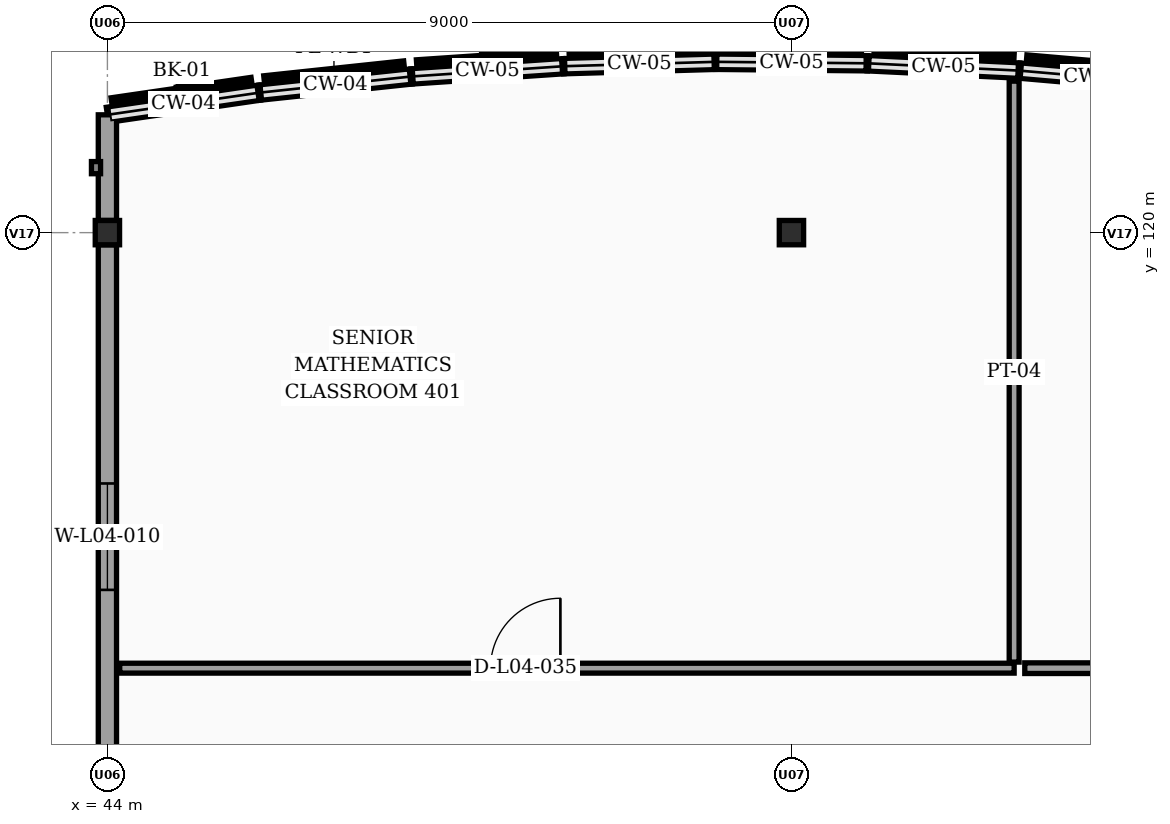
"""IFC4 building model, lengths in metres.
Left out: names, types, materials, properties, quantities, classifications, styles, units other than length and angle.
Written with IfcOpenShell. Run it as: python <this file> out.ifc"""

import sys

from ifc_helpers import new_model, si_unit, direction, frame, frame_2d, origin, origin_2d, place, context, subcontext, project, spatial, rectangle, extrude, element, fill, save


model = new_model("IFC4")
c1 = context("Model", 3, precision=1e-05, world=origin(), true_north=direction((0.0, 1.0)))
c2 = subcontext(c1, "Body", "Model", "MODEL_VIEW")
j1 = project(units=[si_unit("LENGTHUNIT", "METRE"), si_unit("PLANEANGLEUNIT", "RADIAN")], contexts=[c1])
p1 = place(None, origin())
s1 = spatial("IfcSite", under=j1, at=p1, CompositionType="ELEMENT")
p2 = place(p1, origin())
s2 = spatial("IfcBuilding", under=s1, at=p2, CompositionType="ELEMENT")
p3 = place(p2, frame((0.0, 0.0, 16.2)))
s3 = spatial("IfcBuildingStorey", under=s2, at=p3, CompositionType="ELEMENT", Elevation=16.2)
for number, where, z_axis, x_axis in (
    (1, (44.0, 120.0, 0.0), (0.0, 0.0, 1.0), (1.0, 0.0, 0.0)),
    (2, (53.0, 120.0, 0.0), (0.0, 0.0, 1.0), (1.0, 0.0, 0.0)),
):
    element("IfcColumn", number, at=place(p3, frame(where, z_axis=z_axis, x_axis=x_axis)), inside=s3, PredefinedType="COLUMN", context=c2, shape_type="SweptSolid", body=[
        extrude(rectangle(XDim=0.32, YDim=0.32, at=origin_2d()), origin(), (0.0, 0.0, 1.0), 3.9),
    ])
p4 = place(p3, frame((44.0, 121.55, 0.0), z_axis=(0.0, 0.0, 1.0), x_axis=(0.989544477223, 0.144228040259, 0.0)))
e3 = element("IfcWall", 3, at=p4, inside=s3, PredefinedType="SOLIDWALL", context=c2, shape_type="SweptSolid", body=[
    extrude(rectangle(XDim=2.021, YDim=0.2, at=frame_2d((1.011, 0.0))), origin(), (0.0, 0.0, 1.0), 0.95),
])
p5 = place(p3, frame((46.0, 121.842, 0.0), z_axis=(0.0, 0.0, 1.0), x_axis=(0.994395160059, 0.105727317433, 0.0)))
e4 = element("IfcWall", 4, at=p5, inside=s3, PredefinedType="SOLIDWALL", context=c2, shape_type="SweptSolid", body=[
    extrude(rectangle(XDim=2.011, YDim=0.2, at=frame_2d((1.006, 0.0))), origin(), (0.0, 0.0, 1.0), 0.95),
])
p6 = place(p3, frame((48.0, 122.054, 0.0), z_axis=(0.0, 0.0, 1.0), x_axis=(0.997729302978, 0.067351599676, 0.0)))
e5 = element("IfcWall", 5, at=p6, inside=s3, PredefinedType="SOLIDWALL", context=c2, shape_type="SweptSolid", body=[
    extrude(rectangle(XDim=2.005, YDim=0.2, at=frame_2d((1.002, 0.0))), origin(), (0.0, 0.0, 1.0), 0.95),
])
p7 = place(p3, frame((50.0, 122.189, 0.0), z_axis=(0.0, 0.0, 1.0), x_axis=(0.999581770858, 0.028918564416, 0.0)))
e6 = element("IfcWall", 6, at=p7, inside=s3, PredefinedType="SOLIDWALL", context=c2, shape_type="SweptSolid", body=[
    extrude(rectangle(XDim=2.001, YDim=0.2, at=frame_2d((1.0, 0.0))), origin(), (0.0, 0.0, 1.0), 0.95),
])
p8 = place(p3, frame((52.0, 122.247, 0.0), z_axis=(0.0, 0.0, 1.0), x_axis=(0.999953504169, -0.009643106302, 0.0)))
e7 = element("IfcWall", 7, at=p8, inside=s3, PredefinedType="SOLIDWALL", context=c2, shape_type="SweptSolid", body=[
    extrude(rectangle(XDim=2.0, YDim=0.2, at=frame_2d((1.0, 0.0))), origin(), (0.0, 0.0, 1.0), 0.95),
])
p9 = place(p3, frame((54.0, 122.228, 0.0), z_axis=(0.0, 0.0, 1.0), x_axis=(0.99884540439, -0.048040172037, 0.0)))
e8 = element("IfcWall", 8, at=p9, inside=s3, PredefinedType="SOLIDWALL", context=c2, shape_type="SweptSolid", body=[
    extrude(rectangle(XDim=2.002, YDim=0.2, at=frame_2d((1.001, 0.0))), origin(), (0.0, 0.0, 1.0), 0.95),
])
p10 = place(p3, frame((56.0, 122.132, 0.0), z_axis=(0.0, 0.0, 1.0), x_axis=(0.996244237948, -0.086587633962, 0.0)))
e9 = element("IfcWall", 9, at=p10, inside=s3, PredefinedType="SOLIDWALL", context=c2, shape_type="SweptSolid", body=[
    extrude(rectangle(XDim=2.008, YDim=0.2, at=frame_2d((1.004, 0.0))), origin(), (0.0, 0.0, 1.0), 0.95),
])
p11 = place(p3, frame((44.0, 112.16, 0.0), z_axis=(0.0, 0.0, 1.0), x_axis=(0.0, 1.0, 0.0)))
e10 = element("IfcWall", 10, at=p11, inside=s3, PredefinedType="SOLIDWALL", context=c2, shape_type="SweptSolid", body=[
    extrude(rectangle(XDim=7.68, YDim=0.24, at=frame_2d((3.84, 0.0))), origin(), (0.0, 0.0, 1.0), 3.29),
])
p12 = place(p11, frame((3.14, 0.0, 0.95)))
e11 = element("IfcOpeningElement", 11, at=p12, cuts=e10, PredefinedType="OPENING", context=c2, shape_type="SweptSolid", body=[
    extrude(rectangle(XDim=1.4, YDim=1.65, at=frame_2d((0.7, 0.825))), frame((0.0, 0.13, 0.0), z_axis=(0.0, -1.0, 0.0), x_axis=(1.0, 0.0, 0.0)), (0.0, 0.0, 1.0), 0.26),
])
p13 = place(p3, frame((44.0, 120.16, 0.0), z_axis=(0.0, 0.0, 1.0), x_axis=(0.0, 1.0, 0.0)))
e12 = element("IfcWall", 12, at=p13, inside=s3, PredefinedType="SOLIDWALL", context=c2, shape_type="SweptSolid", body=[
    extrude(rectangle(XDim=1.39, YDim=0.24, at=frame_2d((0.695, 0.0))), origin(), (0.0, 0.0, 1.0), 3.29),
])
p14 = place(p3, frame((44.162, 114.27, 0.0), z_axis=(0.0, 0.0, 1.0), x_axis=(1.0, 0.0, 0.0)))
e13 = element("IfcWall", 13, at=p14, inside=s3, PredefinedType="PARTITIONING", context=c2, shape_type="SweptSolid", body=[
    extrude(rectangle(XDim=11.768, YDim=0.13, at=frame_2d((5.884, 0.0))), origin(), (0.0, 0.0, 1.0), 3.65),
])
p15 = place(p14, frame((4.878, 0.0, 0.0)))
e14 = element("IfcOpeningElement", 14, at=p15, cuts=e13, PredefinedType="OPENING", context=c2, shape_type="SweptSolid", body=[
    extrude(rectangle(XDim=0.92, YDim=2.1, at=frame_2d((0.46, 1.05))), frame((0.0, 0.075, 0.0), z_axis=(0.0, -1.0, 0.0), x_axis=(1.0, 0.0, 0.0)), (0.0, 0.0, 1.0), 0.15),
])
p16 = place(p3, frame((55.93, 114.35, 0.0), z_axis=(0.0, 0.0, 1.0), x_axis=(0.0, 1.0, 0.0)))
e15 = element("IfcWall", 15, at=p16, inside=s3, PredefinedType="PARTITIONING", context=c2, shape_type="SweptSolid", body=[
    extrude(rectangle(XDim=7.643, YDim=0.13, at=frame_2d((3.821, 0.0))), origin(), (0.0, 0.0, 1.0), 3.65),
])
p17 = place(p3, frame((56.07, 114.27, 0.0), z_axis=(0.0, 0.0, 1.0), x_axis=(1.0, 0.0, 0.0)))
e16 = element("IfcWall", 16, at=p17, inside=s3, PredefinedType="PARTITIONING", context=c2, shape_type="SweptSolid", body=[
    extrude(rectangle(XDim=8.86, YDim=0.14, at=frame_2d((4.43, 0.0))), origin(), (0.0, 0.0, 1.0), 3.65),
])
p18 = place(p17, frame((3.955, 0.0, 0.0)))
e17 = element("IfcOpeningElement", 17, at=p18, cuts=e16, PredefinedType="OPENING", context=c2, shape_type="SweptSolid", body=[
    extrude(rectangle(XDim=0.95, YDim=2.1, at=frame_2d((0.475, 1.05))), frame((0.0, 0.08, 0.0), z_axis=(0.0, -1.0, 0.0), x_axis=(1.0, 0.0, 0.0)), (0.0, 0.0, 1.0), 0.16),
])
p19 = place(p12, origin())
e18 = element("IfcWindow", 18, at=p19, inside=s3, PartitioningType="SINGLE_PANEL", PredefinedType="WINDOW", context=c2, shape_type="SweptSolid", body=[
    extrude(rectangle(XDim=1.4, YDim=1.65, at=frame_2d((0.7, 0.825))), frame((0.0, 0.03, 0.0), z_axis=(0.0, -1.0, 0.0), x_axis=(1.0, 0.0, 0.0)), (0.0, 0.0, 1.0), 0.06),
])
fill(e11, e18)
p20 = place(p15, origin())
e19 = element("IfcDoor", 19, at=p20, inside=s3, OperationType="SINGLE_SWING_RIGHT", PredefinedType="DOOR", context=c2, shape_type="SweptSolid", body=[
    extrude(rectangle(XDim=0.92, YDim=2.1, at=frame_2d((0.46, 1.05))), frame((0.0, 0.025, 0.0), z_axis=(0.0, -1.0, 0.0), x_axis=(1.0, 0.0, 0.0)), (0.0, 0.0, 1.0), 0.05),
])
fill(e14, e19)
save(model, sys.argv[1])
